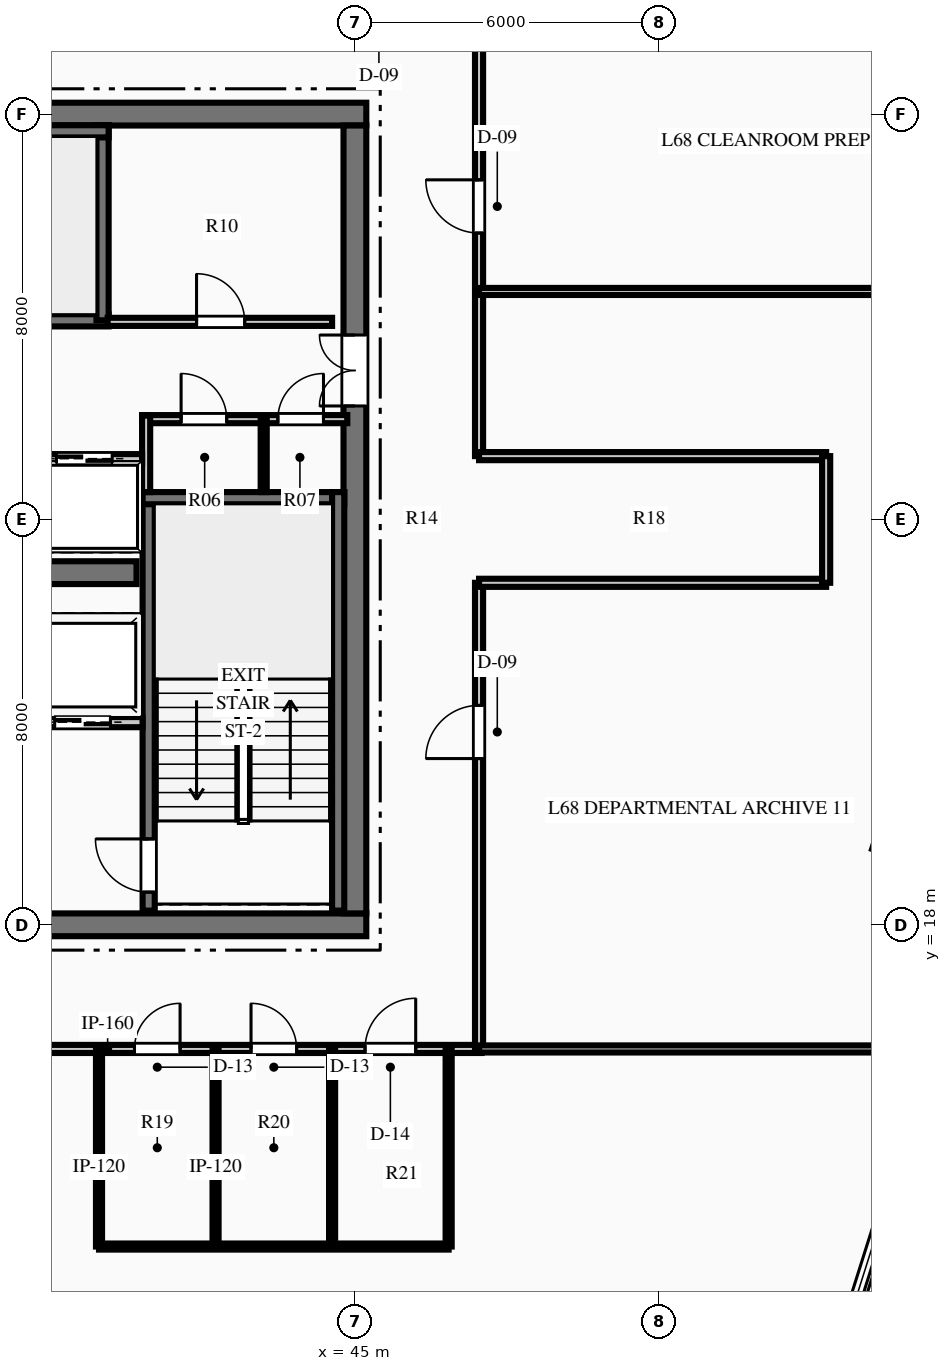
"""IFC4 building model, lengths in metres.
Left out: names, types, materials, properties, quantities, classifications, styles, units other than length and angle.
Written with IfcOpenShell. Run it as: python <this file> out.ifc"""

import sys

from ifc_helpers import new_model, si_unit, direction, frame, frame_2d, origin, place, context, subcontext, project, spatial, rectangle, extrude, element, fill, save


model = new_model("IFC4")
c1 = context("Model", 3, precision=1e-05, world=origin(), true_north=direction((0.0, 1.0)))
c2 = subcontext(c1, "Body", "Model", "MODEL_VIEW")
j1 = project(units=[si_unit("LENGTHUNIT", "METRE"), si_unit("PLANEANGLEUNIT", "RADIAN")], contexts=[c1])
p1 = place(None, origin())
s1 = spatial("IfcSite", under=j1, at=p1, CompositionType="ELEMENT")
p2 = place(p1, origin())
s2 = spatial("IfcBuilding", under=s1, at=p2, CompositionType="ELEMENT")
p3 = place(p2, frame((0.0, 0.0, 271.2)))
s3 = spatial("IfcBuildingStorey", under=s2, at=p3, CompositionType="ELEMENT", Elevation=271.2)
p4 = place(p3, frame((26.775, 18.0, 0.0), z_axis=(0.0, 0.0, 1.0), x_axis=(1.0, 0.0, 0.0)))
e1 = element("IfcWall", 1, at=p4, inside=s3, PredefinedType="SHEAR", context=c2, shape_type="SweptSolid", body=[
    extrude(rectangle(XDim=18.45, YDim=0.45, at=frame_2d((9.225, 0.0))), origin(), (0.0, 0.0, 1.0), 3.75),
])
p5 = place(p4, frame((7.325, 0.0, 0.0)))
e2 = element("IfcOpeningElement", 2, at=p5, cuts=e1, PredefinedType="OPENING", context=c2, shape_type="SweptSolid", body=[
    extrude(rectangle(XDim=1.1, YDim=2.15, at=frame_2d((0.55, 1.075))), frame((0.0, 0.235, 0.0), z_axis=(0.0, -1.0, 0.0), x_axis=(1.0, 0.0, 0.0)), (0.0, 0.0, 1.0), 0.47),
])
p6 = place(p4, frame((10.025, 0.0, 0.0)))
e3 = element("IfcOpeningElement", 3, at=p6, cuts=e1, PredefinedType="OPENING", context=c2, shape_type="SweptSolid", body=[
    extrude(rectangle(XDim=1.1, YDim=2.15, at=frame_2d((0.55, 1.075))), frame((0.0, 0.235, 0.0), z_axis=(0.0, -1.0, 0.0), x_axis=(1.0, 0.0, 0.0)), (0.0, 0.0, 1.0), 0.47),
])
p7 = place(p3, frame((26.775, 34.0, 0.0), z_axis=(0.0, 0.0, 1.0), x_axis=(1.0, 0.0, 0.0)))
e4 = element("IfcWall", 4, at=p7, inside=s3, PredefinedType="SHEAR", context=c2, shape_type="SweptSolid", body=[
    extrude(rectangle(XDim=18.45, YDim=0.45, at=frame_2d((9.225, 0.0))), origin(), (0.0, 0.0, 1.0), 3.75),
])
p8 = place(p3, frame((45.0, 18.225, 0.0), z_axis=(0.0, 0.0, 1.0), x_axis=(0.0, 1.0, 0.0)))
e5 = element("IfcWall", 5, at=p8, inside=s3, PredefinedType="SHEAR", context=c2, shape_type="SweptSolid", body=[
    extrude(rectangle(XDim=15.55, YDim=0.45, at=frame_2d((7.775, 0.0))), origin(), (0.0, 0.0, 1.0), 3.75),
])
p9 = place(p8, frame((10.015, 0.0, 0.0)))
e6 = element("IfcOpeningElement", 6, at=p9, cuts=e5, PredefinedType="OPENING", context=c2, shape_type="SweptSolid", body=[
    extrude(rectangle(XDim=1.4, YDim=2.2, at=frame_2d((0.7, 1.1))), frame((0.0, 0.235, 0.0), z_axis=(0.0, -1.0, 0.0), x_axis=(1.0, 0.0, 0.0)), (0.0, 0.0, 1.0), 0.47),
])
p10 = place(p3, frame((31.31, 24.95, 0.0), z_axis=(0.0, 0.0, 1.0), x_axis=(1.0, 0.0, 0.0)))
e7 = element("IfcWall", 7, at=p10, inside=s3, PredefinedType="SHEAR", context=c2, shape_type="SweptSolid", body=[
    extrude(rectangle(XDim=9.38, YDim=0.45, at=frame_2d((4.69, 0.0))), origin(), (0.0, 0.0, 1.0), 3.75),
])
p11 = place(p3, frame((40.93, 18.28, 0.0), z_axis=(0.0, 0.0, 1.0), x_axis=(0.0, 1.0, 0.0)))
e8 = element("IfcWall", 8, at=p11, inside=s3, PredefinedType="SHEAR", context=c2, shape_type="SweptSolid", body=[
    extrude(rectangle(XDim=8.26, YDim=0.24, at=frame_2d((4.13, 0.0))), origin(), (0.0, 0.0, 1.0), 3.75),
])
p12 = place(p11, frame((0.365, 0.0, 0.0)))
e9 = element("IfcOpeningElement", 9, at=p12, cuts=e8, PredefinedType="OPENING", context=c2, shape_type="SweptSolid", body=[
    extrude(rectangle(XDim=1.05, YDim=2.15, at=frame_2d((0.525, 1.075))), frame((0.0, 0.13, 0.0), z_axis=(0.0, -1.0, 0.0), x_axis=(1.0, 0.0, 0.0)), (0.0, 0.0, 1.0), 0.26),
])
p13 = place(p3, frame((40.81, 26.42, 0.0), z_axis=(0.0, 0.0, 1.0), x_axis=(1.0, 0.0, 0.0)))
e10 = element("IfcWall", 10, at=p13, inside=s3, PredefinedType="SHEAR", context=c2, shape_type="SweptSolid", body=[
    extrude(rectangle(XDim=3.98, YDim=0.24, at=frame_2d((1.99, 0.0))), origin(), (0.0, 0.0, 1.0), 3.75),
])
p14 = place(p3, frame((44.67, 18.28, 0.0), z_axis=(0.0, 0.0, 1.0), x_axis=(0.0, 1.0, 0.0)))
e11 = element("IfcWall", 11, at=p14, inside=s3, PredefinedType="SHEAR", context=c2, shape_type="SweptSolid", body=[
    extrude(rectangle(XDim=8.26, YDim=0.24, at=frame_2d((4.13, 0.0))), origin(), (0.0, 0.0, 1.0), 3.75),
])
p15 = place(p3, frame((31.76, 29.93, 0.0), z_axis=(0.0, 0.0, 1.0), x_axis=(1.0, 0.0, 0.0)))
e12 = element("IfcWall", 12, at=p15, inside=s3, PredefinedType="SHEAR", context=c2, shape_type="SweptSolid", body=[
    extrude(rectangle(XDim=8.38, YDim=0.24, at=frame_2d((4.19, 0.0))), origin(), (0.0, 0.0, 1.0), 3.75),
])
p16 = place(p15, frame((0.565, 0.0, 0.0)))
e13 = element("IfcOpeningElement", 13, at=p16, cuts=e12, PredefinedType="OPENING", context=c2, shape_type="SweptSolid", body=[
    extrude(rectangle(XDim=1.05, YDim=2.15, at=frame_2d((0.525, 1.075))), frame((0.0, 0.13, 0.0), z_axis=(0.0, -1.0, 0.0), x_axis=(1.0, 0.0, 0.0)), (0.0, 0.0, 1.0), 0.26),
])
p17 = place(p3, frame((40.02, 29.93, 0.0), z_axis=(0.0, 0.0, 1.0), x_axis=(0.0, 1.0, 0.0)))
e14 = element("IfcWall", 14, at=p17, inside=s3, PredefinedType="SHEAR", context=c2, shape_type="SweptSolid", body=[
    extrude(rectangle(XDim=3.85, YDim=0.24, at=frame_2d((1.925, 0.0))), origin(), (0.0, 0.0, 1.0), 3.75),
])
p18 = place(p3, frame((37.85, 33.66, 0.0), z_axis=(0.0, 0.0, 1.0), x_axis=(1.0, 0.0, 0.0)))
e15 = element("IfcWall", 15, at=p18, inside=s3, PredefinedType="SHEAR", context=c2, shape_type="SweptSolid", body=[
    extrude(rectangle(XDim=2.29, YDim=0.24, at=frame_2d((1.145, 0.0))), origin(), (0.0, 0.0, 1.0), 3.75),
])
p19 = place(p3, frame((36.12, 22.0, 0.0), z_axis=(0.0, 0.0, 1.0), x_axis=(1.0, 0.0, 0.0)))
e16 = element("IfcWall", 16, at=p19, inside=s3, PredefinedType="PARTITIONING", context=c2, shape_type="SweptSolid", body=[
    extrude(rectangle(XDim=4.69, YDim=0.2, at=frame_2d((2.345, 0.0))), origin(), (0.0, 0.0, 1.0), 3.48),
])
p20 = place(p19, frame((2.955, 0.0, 0.0)))
e17 = element("IfcOpeningElement", 17, at=p20, cuts=e16, PredefinedType="OPENING", context=c2, shape_type="SweptSolid", body=[
    extrude(rectangle(XDim=1.1, YDim=2.15, at=frame_2d((0.55, 1.075))), frame((0.0, 0.11, 0.0), z_axis=(0.0, -1.0, 0.0), x_axis=(1.0, 0.0, 0.0)), (0.0, 0.0, 1.0), 0.22),
])
p21 = place(p19, frame((0.08, 0.0, 0.0)))
e18 = element("IfcOpeningElement", 18, at=p21, cuts=e16, PredefinedType="OPENING", context=c2, shape_type="SweptSolid", body=[
    extrude(rectangle(XDim=1.4, YDim=2.2, at=frame_2d((0.7, 1.1))), frame((0.0, 0.11, 0.0), z_axis=(0.0, -1.0, 0.0), x_axis=(1.0, 0.0, 0.0)), (0.0, 0.0, 1.0), 0.22),
])
p22 = place(p3, frame((40.8, 27.98, 0.0), z_axis=(0.0, 0.0, 1.0), x_axis=(1.0, 0.0, 0.0)))
e19 = element("IfcWall", 19, at=p22, inside=s3, PredefinedType="PARTITIONING", context=c2, shape_type="SweptSolid", body=[
    extrude(rectangle(XDim=4.05, YDim=0.16, at=frame_2d((2.025, 0.0))), origin(), (0.0, 0.0, 1.0), 3.48),
])
p23 = place(p22, frame((0.77, 0.0, 0.0)))
e20 = element("IfcOpeningElement", 20, at=p23, cuts=e19, PredefinedType="OPENING", context=c2, shape_type="SweptSolid", body=[
    extrude(rectangle(XDim=0.9, YDim=2.15, at=frame_2d((0.45, 1.075))), frame((0.0, 0.09, 0.0), z_axis=(0.0, -1.0, 0.0), x_axis=(1.0, 0.0, 0.0)), (0.0, 0.0, 1.0), 0.18),
])
p24 = place(p22, frame((2.68, 0.0, 0.0)))
e21 = element("IfcOpeningElement", 21, at=p24, cuts=e19, PredefinedType="OPENING", context=c2, shape_type="SweptSolid", body=[
    extrude(rectangle(XDim=0.9, YDim=2.15, at=frame_2d((0.45, 1.075))), frame((0.0, 0.09, 0.0), z_axis=(0.0, -1.0, 0.0), x_axis=(1.0, 0.0, 0.0)), (0.0, 0.0, 1.0), 0.18),
])
p25 = place(p3, frame((40.88, 26.54, 0.0), z_axis=(0.0, 0.0, 1.0), x_axis=(0.0, 1.0, 0.0)))
e22 = element("IfcWall", 22, at=p25, inside=s3, PredefinedType="PARTITIONING", context=c2, shape_type="SweptSolid", body=[
    extrude(rectangle(XDim=1.51, YDim=0.16, at=frame_2d((0.755, 0.0))), origin(), (0.0, 0.0, 1.0), 3.48),
])
p26 = place(p3, frame((43.2, 26.54, 0.0), z_axis=(0.0, 0.0, 1.0), x_axis=(0.0, 1.0, 0.0)))
e23 = element("IfcWall", 23, at=p26, inside=s3, PredefinedType="PARTITIONING", context=c2, shape_type="SweptSolid", body=[
    extrude(rectangle(XDim=1.44, YDim=0.12, at=frame_2d((0.72, 0.0))), origin(), (0.0, 0.0, 1.0), 3.48),
])
p27 = place(p3, frame((40.12, 29.9, 0.0), z_axis=(0.0, 0.0, 1.0), x_axis=(1.0, 0.0, 0.0)))
e24 = element("IfcWall", 24, at=p27, inside=s3, PredefinedType="PARTITIONING", context=c2, shape_type="SweptSolid", body=[
    extrude(rectangle(XDim=4.43, YDim=0.16, at=frame_2d((2.215, 0.0))), origin(), (0.0, 0.0, 1.0), 3.48),
])
p28 = place(p27, frame((1.755, 0.0, 0.0)))
e25 = element("IfcOpeningElement", 25, at=p28, cuts=e24, PredefinedType="OPENING", context=c2, shape_type="SweptSolid", body=[
    extrude(rectangle(XDim=0.95, YDim=2.15, at=frame_2d((0.475, 1.075))), frame((0.0, 0.09, 0.0), z_axis=(0.0, -1.0, 0.0), x_axis=(1.0, 0.0, 0.0)), (0.0, 0.0, 1.0), 0.18),
])
p29 = place(p3, frame((31.2, 27.2, 0.0), z_axis=(0.0, 0.0, 1.0), x_axis=(1.0, 0.0, 0.0)))
e26 = element("IfcWall", 26, at=p29, inside=s3, PredefinedType="PARTITIONING", context=c2, shape_type="SweptSolid", body=[
    extrude(rectangle(XDim=9.6, YDim=0.18, at=frame_2d((4.8, 0.0))), origin(), (0.0, 0.0, 1.0), 3.48),
])
p30 = place(p29, frame((0.59, 0.0, 0.0)))
e27 = element("IfcOpeningElement", 27, at=p30, cuts=e26, PredefinedType="OPENING", context=c2, shape_type="SweptSolid", body=[
    extrude(rectangle(XDim=1.1, YDim=2.15, at=frame_2d((0.55, 1.075))), frame((0.0, 0.1, 0.0), z_axis=(0.0, -1.0, 0.0), x_axis=(1.0, 0.0, 0.0)), (0.0, 0.0, 1.0), 0.2),
])
p31 = place(p29, frame((2.99, 0.0, 0.0)))
e28 = element("IfcOpeningElement", 28, at=p31, cuts=e26, PredefinedType="OPENING", context=c2, shape_type="SweptSolid", body=[
    extrude(rectangle(XDim=1.1, YDim=2.15, at=frame_2d((0.55, 1.075))), frame((0.0, 0.1, 0.0), z_axis=(0.0, -1.0, 0.0), x_axis=(1.0, 0.0, 0.0)), (0.0, 0.0, 1.0), 0.2),
])
p32 = place(p29, frame((5.51, 0.0, 0.0)))
e29 = element("IfcOpeningElement", 29, at=p32, cuts=e26, PredefinedType="OPENING", context=c2, shape_type="SweptSolid", body=[
    extrude(rectangle(XDim=1.1, YDim=2.15, at=frame_2d((0.55, 1.075))), frame((0.0, 0.1, 0.0), z_axis=(0.0, -1.0, 0.0), x_axis=(1.0, 0.0, 0.0)), (0.0, 0.0, 1.0), 0.2),
])
p33 = place(p29, frame((7.91, 0.0, 0.0)))
e30 = element("IfcOpeningElement", 30, at=p33, cuts=e26, PredefinedType="OPENING", context=c2, shape_type="SweptSolid", body=[
    extrude(rectangle(XDim=1.1, YDim=2.15, at=frame_2d((0.55, 1.075))), frame((0.0, 0.1, 0.0), z_axis=(0.0, -1.0, 0.0), x_axis=(1.0, 0.0, 0.0)), (0.0, 0.0, 1.0), 0.2),
])
p34 = place(p3, frame((37.25, 15.55, 0.0), z_axis=(0.0, 0.0, 1.0), x_axis=(1.0, 0.0, 0.0)))
e31 = element("IfcWall", 31, at=p34, inside=s3, PredefinedType="PARTITIONING", context=c2, shape_type="SweptSolid", body=[
    extrude(rectangle(XDim=10.25, YDim=0.16, at=frame_2d((5.125, 0.0))), origin(), (0.0, 0.0, 1.0), 3.48),
])
p35 = place(p34, frame((3.4, 0.0, 0.0)))
e32 = element("IfcOpeningElement", 32, at=p35, cuts=e31, PredefinedType="OPENING", context=c2, shape_type="SweptSolid", body=[
    extrude(rectangle(XDim=0.9, YDim=2.15, at=frame_2d((0.45, 1.075))), frame((0.0, 0.09, 0.0), z_axis=(0.0, -1.0, 0.0), x_axis=(1.0, 0.0, 0.0)), (0.0, 0.0, 1.0), 0.18),
])
p36 = place(p34, frame((5.7, 0.0, 0.0)))
e33 = element("IfcOpeningElement", 33, at=p36, cuts=e31, PredefinedType="OPENING", context=c2, shape_type="SweptSolid", body=[
    extrude(rectangle(XDim=0.9, YDim=2.15, at=frame_2d((0.45, 1.075))), frame((0.0, 0.09, 0.0), z_axis=(0.0, -1.0, 0.0), x_axis=(1.0, 0.0, 0.0)), (0.0, 0.0, 1.0), 0.18),
])
p37 = place(p34, frame((7.95, 0.0, 0.0)))
e34 = element("IfcOpeningElement", 34, at=p37, cuts=e31, PredefinedType="OPENING", context=c2, shape_type="SweptSolid", body=[
    extrude(rectangle(XDim=1.0, YDim=2.15, at=frame_2d((0.5, 1.075))), frame((0.0, 0.09, 0.0), z_axis=(0.0, -1.0, 0.0), x_axis=(1.0, 0.0, 0.0)), (0.0, 0.0, 1.0), 0.18),
])
p38 = place(p3, frame((47.45, 15.55, 0.0), z_axis=(0.0, 0.0, 1.0), x_axis=(0.0, 1.0, 0.0)))
e35 = element("IfcWall", 35, at=p38, inside=s3, PredefinedType="PARTITIONING", context=c2, shape_type="SweptSolid", body=[
    extrude(rectangle(XDim=9.2, YDim=0.16, at=frame_2d((4.6, 0.0))), origin(), (0.0, 0.0, 1.0), 3.48),
])
p39 = place(p38, frame((5.731, 0.0, 0.0)))
e36 = element("IfcOpeningElement", 36, at=p39, cuts=e35, PredefinedType="OPENING", context=c2, shape_type="SweptSolid", body=[
    extrude(rectangle(XDim=1.05, YDim=2.15, at=frame_2d((0.525, 1.075))), frame((0.0, 0.09, 0.0), z_axis=(0.0, -1.0, 0.0), x_axis=(1.0, 0.0, 0.0)), (0.0, 0.0, 1.0), 0.18),
])
p40 = place(p3, frame((47.45, 27.25, 0.0), z_axis=(0.0, 0.0, 1.0), x_axis=(0.0, 1.0, 0.0)))
e37 = element("IfcWall", 37, at=p40, inside=s3, PredefinedType="PARTITIONING", context=c2, shape_type="SweptSolid", body=[
    extrude(rectangle(XDim=9.2, YDim=0.16, at=frame_2d((4.6, 0.0))), origin(), (0.0, 0.0, 1.0), 3.48),
])
p41 = place(p40, frame((4.403, 0.0, 0.0)))
e38 = element("IfcOpeningElement", 38, at=p41, cuts=e37, PredefinedType="OPENING", context=c2, shape_type="SweptSolid", body=[
    extrude(rectangle(XDim=1.05, YDim=2.15, at=frame_2d((0.525, 1.075))), frame((0.0, 0.09, 0.0), z_axis=(0.0, -1.0, 0.0), x_axis=(1.0, 0.0, 0.0)), (0.0, 0.0, 1.0), 0.18),
])
for number, where, z_axis, x_axis in (
    (39, (47.45, 24.75, 0.0), (0.0, 0.0, 1.0), (1.0, 0.0, 0.0)),
    (40, (47.45, 27.25, 0.0), (0.0, 0.0, 1.0), (1.0, 0.0, 0.0)),
):
    element("IfcWall", number, at=place(p3, frame(where, z_axis=z_axis, x_axis=x_axis)), inside=s3, PredefinedType="PARTITIONING", context=c2, shape_type="SweptSolid", body=[
        extrude(rectangle(XDim=6.85, YDim=0.16, at=frame_2d((3.425, 0.0))), origin(), (0.0, 0.0, 1.0), 3.48),
    ])
p42 = place(p3, frame((54.3, 24.75, 0.0), z_axis=(0.0, 0.0, 1.0), x_axis=(0.0, 1.0, 0.0)))
e41 = element("IfcWall", 41, at=p42, inside=s3, PredefinedType="PARTITIONING", context=c2, shape_type="SweptSolid", body=[
    extrude(rectangle(XDim=2.5, YDim=0.16, at=frame_2d((1.25, 0.0))), origin(), (0.0, 0.0, 1.0), 3.48),
])
for number, where, z_axis, x_axis in (
    (42, (39.95, 11.65, 0.0), (0.0, 0.0, 1.0), (0.0, 1.0, 0.0)),
    (43, (42.25, 11.65, 0.0), (0.0, 0.0, 1.0), (0.0, 1.0, 0.0)),
    (44, (44.55, 11.65, 0.0), (0.0, 0.0, 1.0), (0.0, 1.0, 0.0)),
    (45, (46.85, 11.65, 0.0), (0.0, 0.0, 1.0), (0.0, 1.0, 0.0)),
):
    element("IfcWall", number, at=place(p3, frame(where, z_axis=z_axis, x_axis=x_axis)), inside=s3, PredefinedType="PARTITIONING", context=c2, shape_type="SweptSolid", body=[
        extrude(rectangle(XDim=3.9, YDim=0.12, at=frame_2d((1.95, 0.0))), origin(), (0.0, 0.0, 1.0), 3.48),
    ])
p43 = place(p3, frame((39.95, 11.65, 0.0), z_axis=(0.0, 0.0, 1.0), x_axis=(1.0, 0.0, 0.0)))
e46 = element("IfcWall", 46, at=p43, inside=s3, PredefinedType="PARTITIONING", context=c2, shape_type="SweptSolid", body=[
    extrude(rectangle(XDim=6.9, YDim=0.12, at=frame_2d((3.45, 0.0))), origin(), (0.0, 0.0, 1.0), 3.48),
])
p44 = place(p3, frame((47.45, 15.55, 0.0), z_axis=(0.0, 0.0, 1.0), x_axis=(1.0, 0.0, 0.0)))
e47 = element("IfcWall", 47, at=p44, inside=s3, PredefinedType="PARTITIONING", context=c2, shape_type="SweptSolid", body=[
    extrude(rectangle(XDim=9.142, YDim=0.14, at=frame_2d((4.571, 0.0))), origin(), (0.0, 0.0, 1.0), 3.48),
])
p45 = place(p3, frame((47.45, 30.5, 0.0), z_axis=(0.0, 0.0, 1.0), x_axis=(1.0, 0.0, 0.0)))
e48 = element("IfcWall", 48, at=p45, inside=s3, PredefinedType="PARTITIONING", context=c2, shape_type="SweptSolid", body=[
    extrude(rectangle(XDim=13.871, YDim=0.14, at=frame_2d((6.935, 0.0))), origin(), (0.0, 0.0, 1.0), 3.48),
])
p46 = place(p23, origin())
e49 = element("IfcDoor", 49, at=p46, inside=s3, OperationType="SINGLE_SWING_LEFT", PredefinedType="DOOR", context=c2, shape_type="SweptSolid", body=[
    extrude(rectangle(XDim=0.9, YDim=2.15, at=frame_2d((0.45, 1.075))), frame((0.0, 0.025, 0.0), z_axis=(0.0, -1.0, 0.0), x_axis=(1.0, 0.0, 0.0)), (0.0, 0.0, 1.0), 0.05),
])
fill(e20, e49)
p47 = place(p24, origin())
e50 = element("IfcDoor", 50, at=p47, inside=s3, OperationType="SINGLE_SWING_RIGHT", PredefinedType="DOOR", context=c2, shape_type="SweptSolid", body=[
    extrude(rectangle(XDim=0.9, YDim=2.15, at=frame_2d((0.45, 1.075))), frame((0.0, 0.025, 0.0), z_axis=(0.0, -1.0, 0.0), x_axis=(1.0, 0.0, 0.0)), (0.0, 0.0, 1.0), 0.05),
])
fill(e21, e50)
p48 = place(p28, origin())
e51 = element("IfcDoor", 51, at=p48, inside=s3, OperationType="SINGLE_SWING_LEFT", PredefinedType="DOOR", context=c2, shape_type="SweptSolid", body=[
    extrude(rectangle(XDim=0.95, YDim=2.15, at=frame_2d((0.475, 1.075))), frame((0.0, 0.025, 0.0), z_axis=(0.0, -1.0, 0.0), x_axis=(1.0, 0.0, 0.0)), (0.0, 0.0, 1.0), 0.05),
])
fill(e25, e51)
p49 = place(p12, origin())
e52 = element("IfcDoor", 52, at=p49, inside=s3, OperationType="SINGLE_SWING_RIGHT", PredefinedType="DOOR", context=c2, shape_type="SweptSolid", body=[
    extrude(rectangle(XDim=1.05, YDim=2.15, at=frame_2d((0.525, 1.075))), frame((0.0, 0.025, 0.0), z_axis=(0.0, -1.0, 0.0), x_axis=(1.0, 0.0, 0.0)), (0.0, 0.0, 1.0), 0.05),
])
fill(e9, e52)
p50 = place(p9, origin())
e53 = element("IfcDoor", 53, at=p50, inside=s3, OperationType="DOUBLE_DOOR_SINGLE_SWING", PredefinedType="DOOR", context=c2, shape_type="SweptSolid", body=[
    extrude(rectangle(XDim=1.4, YDim=2.2, at=frame_2d((0.7, 1.1))), frame((0.0, 0.025, 0.0), z_axis=(0.0, -1.0, 0.0), x_axis=(1.0, 0.0, 0.0)), (0.0, 0.0, 1.0), 0.05),
])
fill(e6, e53)
p51 = place(p35, origin())
e54 = element("IfcDoor", 54, at=p51, inside=s3, OperationType="SINGLE_SWING_RIGHT", PredefinedType="DOOR", context=c2, shape_type="SweptSolid", body=[
    extrude(rectangle(XDim=0.9, YDim=2.15, at=frame_2d((0.45, 1.075))), frame((0.0, 0.025, 0.0), z_axis=(0.0, -1.0, 0.0), x_axis=(1.0, 0.0, 0.0)), (0.0, 0.0, 1.0), 0.05),
])
fill(e32, e54)
p52 = place(p36, origin())
e55 = element("IfcDoor", 55, at=p52, inside=s3, OperationType="SINGLE_SWING_LEFT", PredefinedType="DOOR", context=c2, shape_type="SweptSolid", body=[
    extrude(rectangle(XDim=0.9, YDim=2.15, at=frame_2d((0.45, 1.075))), frame((0.0, 0.025, 0.0), z_axis=(0.0, -1.0, 0.0), x_axis=(1.0, 0.0, 0.0)), (0.0, 0.0, 1.0), 0.05),
])
fill(e33, e55)
p53 = place(p37, origin())
e56 = element("IfcDoor", 56, at=p53, inside=s3, OperationType="SINGLE_SWING_RIGHT", PredefinedType="DOOR", context=c2, shape_type="SweptSolid", body=[
    extrude(rectangle(XDim=1.0, YDim=2.15, at=frame_2d((0.5, 1.075))), frame((0.0, 0.025, 0.0), z_axis=(0.0, -1.0, 0.0), x_axis=(1.0, 0.0, 0.0)), (0.0, 0.0, 1.0), 0.05),
])
fill(e34, e56)
p54 = place(p39, origin())
e57 = element("IfcDoor", 57, at=p54, inside=s3, OperationType="SINGLE_SWING_LEFT", PredefinedType="DOOR", context=c2, shape_type="SweptSolid", body=[
    extrude(rectangle(XDim=1.05, YDim=2.15, at=frame_2d((0.525, 1.075))), frame((0.0, 0.025, 0.0), z_axis=(0.0, -1.0, 0.0), x_axis=(1.0, 0.0, 0.0)), (0.0, 0.0, 1.0), 0.05),
])
fill(e36, e57)
p55 = place(p41, origin())
e58 = element("IfcDoor", 58, at=p55, inside=s3, OperationType="SINGLE_SWING_RIGHT", PredefinedType="DOOR", context=c2, shape_type="SweptSolid", body=[
    extrude(rectangle(XDim=1.05, YDim=2.15, at=frame_2d((0.525, 1.075))), frame((0.0, 0.025, 0.0), z_axis=(0.0, -1.0, 0.0), x_axis=(1.0, 0.0, 0.0)), (0.0, 0.0, 1.0), 0.05),
])
fill(e38, e58)
p56 = place(p33, origin())
e59 = element("IfcDoor", 59, at=p56, inside=s3, OperationType="SLIDING_TO_LEFT", PredefinedType="DOOR", context=c2, shape_type="SweptSolid", body=[
    extrude(rectangle(XDim=1.1, YDim=2.15, at=frame_2d((0.55, 1.075))), frame((0.0, 0.025, 0.0), z_axis=(0.0, -1.0, 0.0), x_axis=(1.0, 0.0, 0.0)), (0.0, 0.0, 1.0), 0.05),
])
fill(e30, e59)
p57 = place(p20, origin())
e60 = element("IfcDoor", 60, at=p57, inside=s3, OperationType="SLIDING_TO_LEFT", PredefinedType="DOOR", context=c2, shape_type="SweptSolid", body=[
    extrude(rectangle(XDim=1.1, YDim=2.15, at=frame_2d((0.55, 1.075))), frame((0.0, 0.025, 0.0), z_axis=(0.0, -1.0, 0.0), x_axis=(1.0, 0.0, 0.0)), (0.0, 0.0, 1.0), 0.05),
])
fill(e17, e60)
save(model, sys.argv[1])
